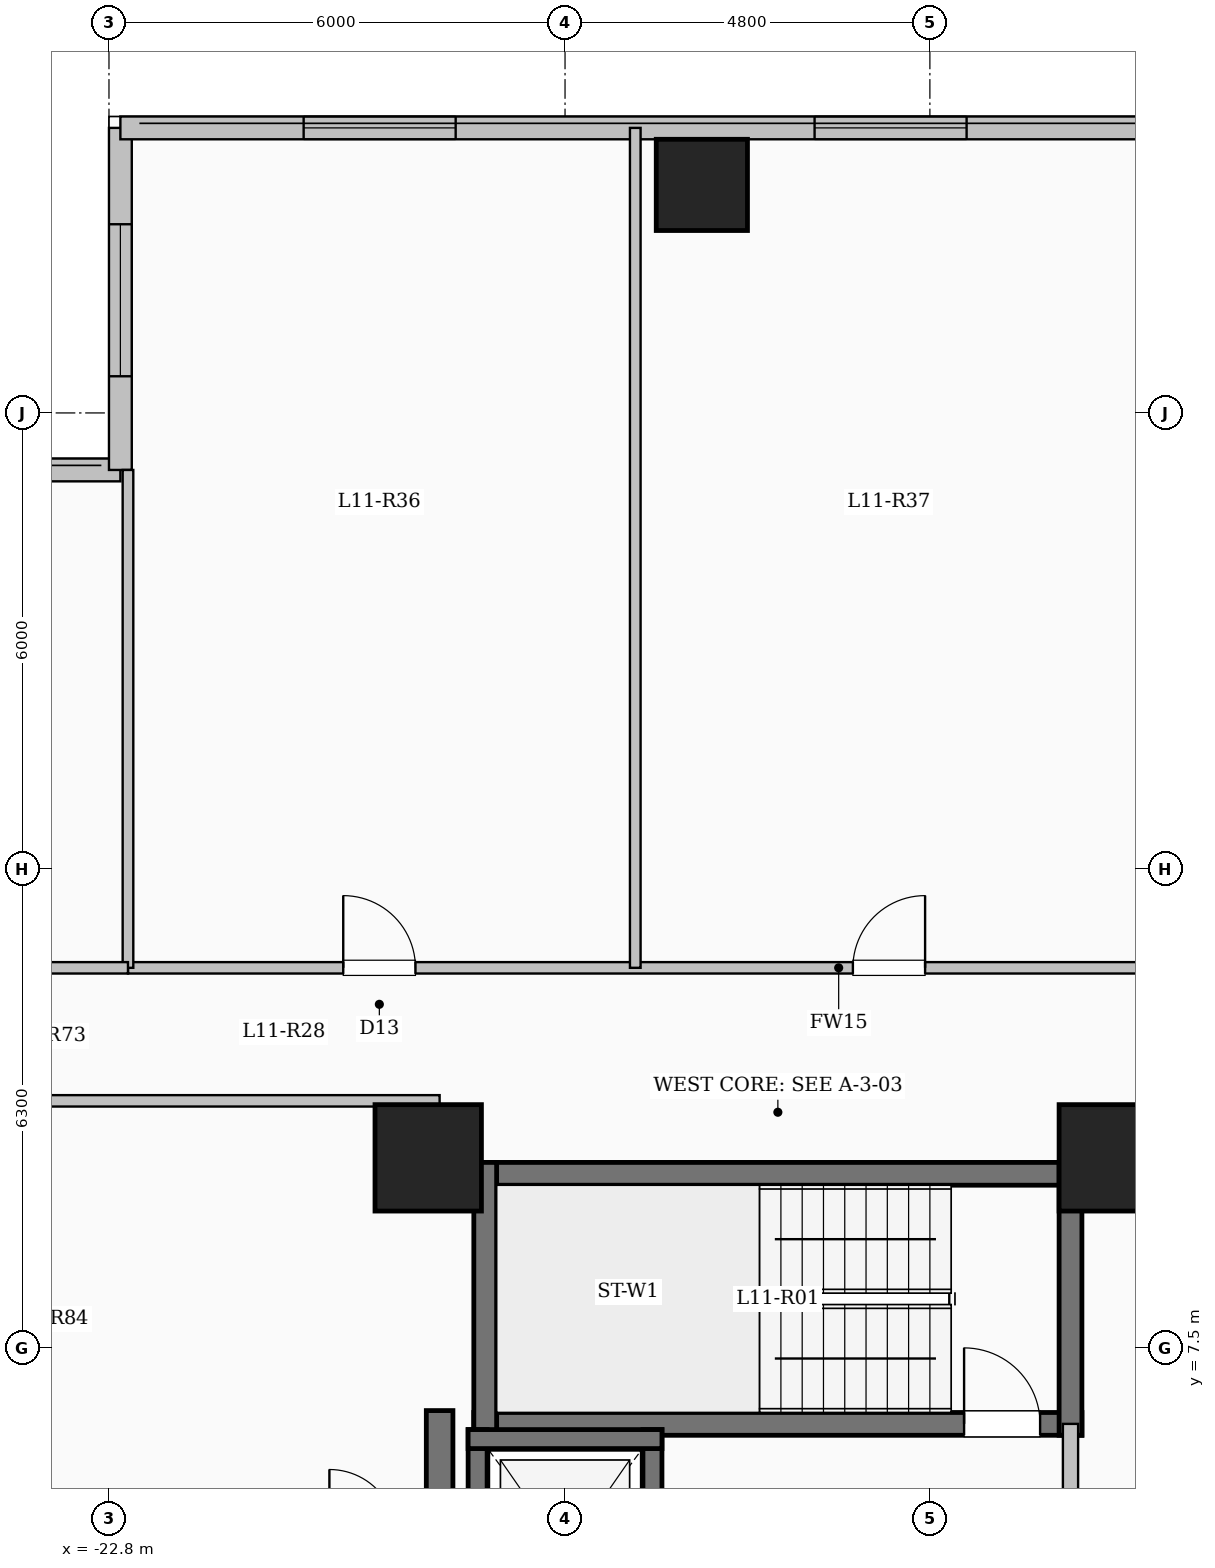
"""IFC4 building model, lengths in metres.
Left out: names, types, materials, properties, quantities, classifications, styles, units other than length and angle.
Written with IfcOpenShell. Run it as: python <this file> out.ifc"""

import sys

from ifc_helpers import new_model, si_unit, direction, frame, frame_2d, origin, origin_2d, place, context, subcontext, project, spatial, rectangle, extrude, element, fill, save


model = new_model("IFC4")
c1 = context("Model", 3, precision=1e-05, world=origin(), true_north=direction((0.0, 1.0)))
c2 = subcontext(c1, "Body", "Model", "MODEL_VIEW")
j1 = project(units=[si_unit("LENGTHUNIT", "METRE"), si_unit("PLANEANGLEUNIT", "RADIAN")], contexts=[c1])
p1 = place(None, origin())
s1 = spatial("IfcSite", under=j1, at=p1, CompositionType="ELEMENT")
p2 = place(p1, origin())
s2 = spatial("IfcBuilding", under=s1, at=p2, CompositionType="ELEMENT")
p3 = place(p2, frame((0.0, 0.0, 44.1)))
s3 = spatial("IfcBuildingStorey", under=s2, at=p3, CompositionType="ELEMENT", Elevation=44.1)
for number, where, z_axis, x_axis in (
    (1, (-9.6, 10.0, 0.0), (0.0, 0.0, 1.0), (1.0, 0.0, 0.0)),
    (2, (-18.6, 10.0, 0.0), (0.0, 0.0, 1.0), (1.0, 0.0, 0.0)),
):
    element("IfcColumn", number, at=place(p3, frame(where, z_axis=z_axis, x_axis=x_axis)), inside=s3, PredefinedType="COLUMN", context=c2, shape_type="SweptSolid", body=[
        extrude(rectangle(XDim=1.4, YDim=1.4, at=origin_2d()), origin(), (0.0, 0.0, 1.0), 3.35),
    ])
p4 = place(p3, frame((-15.0, 22.8, 0.0), z_axis=(0.0, 0.0, 1.0), x_axis=(1.0, 0.0, 0.0)))
e3 = element("IfcColumn", 3, at=p4, inside=s3, PredefinedType="COLUMN", context=c2, shape_type="SweptSolid", body=[
    extrude(rectangle(XDim=1.2, YDim=1.2, at=origin_2d()), origin(), (0.0, 0.0, 1.0), 3.35),
])
p5 = place(p3, frame((-28.65, 19.05, 0.0), z_axis=(0.0, 0.0, 1.0), x_axis=(1.0, 0.0, 0.0)))
e4 = element("IfcWall", 4, at=p5, inside=s3, PredefinedType="SOLIDWALL", context=c2, shape_type="SweptSolid", body=[
    extrude(rectangle(XDim=6.0, YDim=0.3, at=frame_2d((3.0, 0.0))), origin(), (0.0, 0.0, 1.0), 3.1),
])
p6 = place(p5, frame((2.025, 0.0, 0.9)))
e5 = element("IfcOpeningElement", 5, at=p6, cuts=e4, PredefinedType="OPENING", context=c2, shape_type="SweptSolid", body=[
    extrude(rectangle(XDim=2.0, YDim=1.7, at=frame_2d((1.0, 0.85))), frame((0.0, 0.16, 0.0), z_axis=(0.0, -1.0, 0.0), x_axis=(1.0, 0.0, 0.0)), (0.0, 0.0, 1.0), 0.32),
])
p7 = place(p3, frame((-22.65, 19.05, 0.0), z_axis=(0.0, 0.0, 1.0), x_axis=(0.0, 1.0, 0.0)))
e6 = element("IfcWall", 6, at=p7, inside=s3, PredefinedType="SOLIDWALL", context=c2, shape_type="SweptSolid", body=[
    extrude(rectangle(XDim=4.5, YDim=0.3, at=frame_2d((2.25, 0.0))), origin(), (0.0, 0.0, 1.0), 3.1),
])
p8 = place(p7, frame((1.232, 0.0, 0.9)))
e7 = element("IfcOpeningElement", 7, at=p8, cuts=e6, PredefinedType="OPENING", context=c2, shape_type="SweptSolid", body=[
    extrude(rectangle(XDim=2.0, YDim=1.7, at=frame_2d((1.0, 0.85))), frame((0.0, 0.16, 0.0), z_axis=(0.0, -1.0, 0.0), x_axis=(1.0, 0.0, 0.0)), (0.0, 0.0, 1.0), 0.32),
])
p9 = place(p3, frame((-22.65, 23.55, 0.0), z_axis=(0.0, 0.0, 1.0), x_axis=(1.0, 0.0, 0.0)))
e8 = element("IfcWall", 8, at=p9, inside=s3, PredefinedType="SOLIDWALL", context=c2, shape_type="SweptSolid", body=[
    extrude(rectangle(XDim=15.3, YDim=0.3, at=frame_2d((7.65, 0.0))), origin(), (0.0, 0.0, 1.0), 3.1),
])
p10 = place(p9, frame((2.411, 0.0, 0.9)))
e9 = element("IfcOpeningElement", 9, at=p10, cuts=e8, PredefinedType="OPENING", context=c2, shape_type="SweptSolid", body=[
    extrude(rectangle(XDim=2.0, YDim=1.7, at=frame_2d((1.0, 0.85))), frame((0.0, 0.16, 0.0), z_axis=(0.0, -1.0, 0.0), x_axis=(1.0, 0.0, 0.0)), (0.0, 0.0, 1.0), 0.32),
])
p11 = place(p9, frame((9.133, 0.0, 0.9)))
e10 = element("IfcOpeningElement", 10, at=p11, cuts=e8, PredefinedType="OPENING", context=c2, shape_type="SweptSolid", body=[
    extrude(rectangle(XDim=2.0, YDim=1.7, at=frame_2d((1.0, 0.85))), frame((0.0, 0.16, 0.0), z_axis=(0.0, -1.0, 0.0), x_axis=(1.0, 0.0, 0.0)), (0.0, 0.0, 1.0), 0.32),
])
p12 = place(p9, frame((13.862, 0.0, 0.95)))
e11 = element("IfcOpeningElement", 11, at=p12, cuts=e8, PredefinedType="OPENING", context=c2, shape_type="SweptSolid", body=[
    extrude(rectangle(XDim=1.2, YDim=1.5, at=frame_2d((0.6, 0.75))), frame((0.0, 0.16, 0.0), z_axis=(0.0, -1.0, 0.0), x_axis=(1.0, 0.0, 0.0)), (0.0, 0.0, 1.0), 0.32),
])
p13 = place(p3, frame((-18.0, 9.79, 0.0), z_axis=(0.0, 0.0, 1.0), x_axis=(1.0, 0.0, 0.0)))
e12 = element("IfcWall", 12, at=p13, inside=s3, PredefinedType="SHEAR", context=c2, shape_type="SweptSolid", body=[
    extrude(rectangle(XDim=8.0, YDim=0.3, at=frame_2d((4.0, 0.0))), origin(), (0.0, 0.0, 1.0), 3.35),
])
p14 = place(p3, frame((-18.0, 6.5, 0.0), z_axis=(0.0, 0.0, 1.0), x_axis=(1.0, 0.0, 0.0)))
e13 = element("IfcWall", 13, at=p14, inside=s3, PredefinedType="SHEAR", context=c2, shape_type="SweptSolid", body=[
    extrude(rectangle(XDim=8.0, YDim=0.3, at=frame_2d((4.0, 0.0))), origin(), (0.0, 0.0, 1.0), 3.35),
])
p15 = place(p14, frame((6.45, 0.0, 0.0)))
e14 = element("IfcOpeningElement", 14, at=p15, cuts=e13, PredefinedType="OPENING", context=c2, shape_type="SweptSolid", body=[
    extrude(rectangle(XDim=1.0, YDim=2.15, at=frame_2d((0.5, 1.075))), frame((0.0, 0.16, 0.0), z_axis=(0.0, -1.0, 0.0), x_axis=(1.0, 0.0, 0.0)), (0.0, 0.0, 1.0), 0.32),
])
for number, where, z_axis, x_axis in (
    (15, (-17.85, 6.35, 0.0), (0.0, 0.0, 1.0), (0.0, 1.0, 0.0)),
    (16, (-10.15, 6.35, 0.0), (0.0, 0.0, 1.0), (0.0, 1.0, 0.0)),
):
    element("IfcWall", number, at=place(p3, frame(where, z_axis=z_axis, x_axis=x_axis)), inside=s3, PredefinedType="SHEAR", context=c2, shape_type="SweptSolid", body=[
        extrude(rectangle(XDim=3.59, YDim=0.3, at=frame_2d((1.795, 0.0))), origin(), (0.0, 0.0, 1.0), 3.35),
    ])
p16 = place(p3, frame((-10.15, 3.25, 0.0), z_axis=(0.0, 0.0, 1.0), x_axis=(0.0, 1.0, 0.0)))
e17 = element("IfcWall", 17, at=p16, inside=s3, PredefinedType="SOLIDWALL", context=c2, shape_type="SweptSolid", body=[
    extrude(rectangle(XDim=3.25, YDim=0.2, at=frame_2d((1.625, 0.0))), origin(), (0.0, 0.0, 1.0), 3.1),
])
p17 = place(p16, frame((1.1, 0.0, 0.0)))
e18 = element("IfcOpeningElement", 18, at=p17, cuts=e17, PredefinedType="OPENING", context=c2, shape_type="SweptSolid", body=[
    extrude(rectangle(XDim=1.02, YDim=2.15, at=frame_2d((0.51, 1.075))), frame((0.0, 0.11, 0.0), z_axis=(0.0, -1.0, 0.0), x_axis=(1.0, 0.0, 0.0)), (0.0, 0.0, 1.0), 0.22),
])
p18 = place(p3, frame((-17.95, 3.175, 0.0), z_axis=(0.0, 0.0, 1.0), x_axis=(0.0, 1.0, 0.0)))
e19 = element("IfcWall", 19, at=p18, inside=s3, PredefinedType="SHEAR", context=c2, shape_type="SweptSolid", body=[
    extrude(rectangle(XDim=3.25, YDim=0.25, at=frame_2d((1.625, 0.0))), origin(), (0.0, 0.0, 1.0), 3.35),
])
p19 = place(p3, frame((-15.65, 3.175, 0.0), z_axis=(0.0, 0.0, 1.0), x_axis=(0.0, 1.0, 0.0)))
e20 = element("IfcWall", 20, at=p19, inside=s3, PredefinedType="SHEAR", context=c2, shape_type="SweptSolid", body=[
    extrude(rectangle(XDim=3.25, YDim=0.25, at=frame_2d((1.625, 0.0))), origin(), (0.0, 0.0, 1.0), 3.35),
])
p20 = place(p19, frame((1.075, 0.0, 0.0)))
e21 = element("IfcOpeningElement", 21, at=p20, cuts=e20, PredefinedType="OPENING", context=c2, shape_type="SweptSolid", body=[
    extrude(rectangle(XDim=1.1, YDim=2.15, at=frame_2d((0.55, 1.075))), frame((0.0, 0.135, 0.0), z_axis=(0.0, -1.0, 0.0), x_axis=(1.0, 0.0, 0.0)), (0.0, 0.0, 1.0), 0.27),
])
p21 = place(p3, frame((-18.075, 6.3, 0.0), z_axis=(0.0, 0.0, 1.0), x_axis=(1.0, 0.0, 0.0)))
e22 = element("IfcWall", 22, at=p21, inside=s3, PredefinedType="SHEAR", context=c2, shape_type="SweptSolid", body=[
    extrude(rectangle(XDim=2.55, YDim=0.25, at=frame_2d((1.275, 0.0))), origin(), (0.0, 0.0, 1.0), 3.35),
])
p22 = place(p3, frame((-18.45, -7.375, 0.0), z_axis=(0.0, 0.0, 1.0), x_axis=(0.0, 1.0, 0.0)))
e23 = element("IfcWall", 23, at=p22, inside=s3, PredefinedType="SHEAR", context=c2, shape_type="SweptSolid", body=[
    extrude(rectangle(XDim=14.05, YDim=0.35, at=frame_2d((7.025, 0.0))), origin(), (0.0, 0.0, 1.0), 3.35),
])
p23 = place(p3, frame((-22.55, 12.5, 0.0), z_axis=(0.0, 0.0, 1.0), x_axis=(1.0, 0.0, 0.0)))
e24 = element("IfcWall", 24, at=p23, inside=s3, PredefinedType="PARTITIONING", context=c2, shape_type="SweptSolid", body=[
    extrude(rectangle(XDim=18.7, YDim=0.15, at=frame_2d((9.35, 0.0))), origin(), (0.0, 0.0, 1.0), 3.1),
])
p24 = place(p23, frame((2.832, 0.0, 0.0)))
e25 = element("IfcOpeningElement", 25, at=p24, cuts=e24, PredefinedType="OPENING", context=c2, shape_type="SweptSolid", body=[
    extrude(rectangle(XDim=0.95, YDim=2.15, at=frame_2d((0.475, 1.075))), frame((0.0, 0.085, 0.0), z_axis=(0.0, -1.0, 0.0), x_axis=(1.0, 0.0, 0.0)), (0.0, 0.0, 1.0), 0.17),
])
p25 = place(p23, frame((9.537, 0.0, 0.0)))
e26 = element("IfcOpeningElement", 26, at=p25, cuts=e24, PredefinedType="OPENING", context=c2, shape_type="SweptSolid", body=[
    extrude(rectangle(XDim=0.95, YDim=2.15, at=frame_2d((0.475, 1.075))), frame((0.0, 0.085, 0.0), z_axis=(0.0, -1.0, 0.0), x_axis=(1.0, 0.0, 0.0)), (0.0, 0.0, 1.0), 0.17),
])
p26 = place(p23, frame((15.5, 0.0, 0.0)))
e27 = element("IfcOpeningElement", 27, at=p26, cuts=e24, PredefinedType="OPENING", context=c2, shape_type="SweptSolid", body=[
    extrude(rectangle(XDim=0.95, YDim=2.15, at=frame_2d((0.475, 1.075))), frame((0.0, 0.085, 0.0), z_axis=(0.0, -1.0, 0.0), x_axis=(1.0, 0.0, 0.0)), (0.0, 0.0, 1.0), 0.17),
])
p27 = place(p3, frame((-15.876, 12.5, 0.0), z_axis=(0.0, 0.0, 1.0), x_axis=(0.0, 1.0, 0.0)))
e28 = element("IfcWall", 28, at=p27, inside=s3, PredefinedType="PARTITIONING", context=c2, shape_type="SweptSolid", body=[
    extrude(rectangle(XDim=11.05, YDim=0.14, at=frame_2d((5.525, 0.0))), origin(), (0.0, 0.0, 1.0), 3.1),
])
p28 = place(p3, frame((-28.68, 10.75, 0.0), z_axis=(0.0, 0.0, 1.0), x_axis=(1.0, 0.0, 0.0)))
e29 = element("IfcWall", 29, at=p28, inside=s3, PredefinedType="PARTITIONING", context=c2, shape_type="SweptSolid", body=[
    extrude(rectangle(XDim=10.23, YDim=0.15, at=frame_2d((5.115, 0.0))), origin(), (0.0, 0.0, 1.0), 3.1),
])
p29 = place(p3, frame((-22.55, 12.5, 0.0), z_axis=(0.0, 0.0, 1.0), x_axis=(0.0, 1.0, 0.0)))
e30 = element("IfcWall", 30, at=p29, inside=s3, PredefinedType="PARTITIONING", context=c2, shape_type="SweptSolid", body=[
    extrude(rectangle(XDim=6.55, YDim=0.14, at=frame_2d((3.275, 0.0))), origin(), (0.0, 0.0, 1.0), 3.1),
])
p30 = place(p3, frame((-28.68, 12.5, 0.0), z_axis=(0.0, 0.0, 1.0), x_axis=(1.0, 0.0, 0.0)))
e31 = element("IfcWall", 31, at=p30, inside=s3, PredefinedType="PARTITIONING", context=c2, shape_type="SweptSolid", body=[
    extrude(rectangle(XDim=6.13, YDim=0.15, at=frame_2d((3.065, 0.0))), origin(), (0.0, 0.0, 1.0), 3.1),
])
p31 = place(p30, frame((2.59, 0.0, 0.0)))
e32 = element("IfcOpeningElement", 32, at=p31, cuts=e31, PredefinedType="OPENING", context=c2, shape_type="SweptSolid", body=[
    extrude(rectangle(XDim=0.95, YDim=2.15, at=frame_2d((0.475, 1.075))), frame((0.0, 0.085, 0.0), z_axis=(0.0, -1.0, 0.0), x_axis=(1.0, 0.0, 0.0)), (0.0, 0.0, 1.0), 0.17),
])
p32 = place(p8, origin())
e33 = element("IfcWindow", 33, at=p32, inside=s3, PartitioningType="SINGLE_PANEL", PredefinedType="WINDOW", context=c2, shape_type="SweptSolid", body=[
    extrude(rectangle(XDim=2.0, YDim=1.7, at=frame_2d((1.0, 0.85))), frame((0.0, 0.03, 0.0), z_axis=(0.0, -1.0, 0.0), x_axis=(1.0, 0.0, 0.0)), (0.0, 0.0, 1.0), 0.06),
])
fill(e7, e33)
p33 = place(p10, origin())
e34 = element("IfcWindow", 34, at=p33, inside=s3, PartitioningType="SINGLE_PANEL", PredefinedType="WINDOW", context=c2, shape_type="SweptSolid", body=[
    extrude(rectangle(XDim=2.0, YDim=1.7, at=frame_2d((1.0, 0.85))), frame((0.0, 0.03, 0.0), z_axis=(0.0, -1.0, 0.0), x_axis=(1.0, 0.0, 0.0)), (0.0, 0.0, 1.0), 0.06),
])
fill(e9, e34)
p34 = place(p11, origin())
e35 = element("IfcWindow", 35, at=p34, inside=s3, PartitioningType="SINGLE_PANEL", PredefinedType="WINDOW", context=c2, shape_type="SweptSolid", body=[
    extrude(rectangle(XDim=2.0, YDim=1.7, at=frame_2d((1.0, 0.85))), frame((0.0, 0.03, 0.0), z_axis=(0.0, -1.0, 0.0), x_axis=(1.0, 0.0, 0.0)), (0.0, 0.0, 1.0), 0.06),
])
fill(e10, e35)
p35 = place(p15, origin())
e36 = element("IfcDoor", 36, at=p35, inside=s3, OperationType="SINGLE_SWING_LEFT", PredefinedType="DOOR", context=c2, shape_type="SweptSolid", body=[
    extrude(rectangle(XDim=1.0, YDim=2.15, at=frame_2d((0.5, 1.075))), frame((0.0, 0.025, 0.0), z_axis=(0.0, -1.0, 0.0), x_axis=(1.0, 0.0, 0.0)), (0.0, 0.0, 1.0), 0.05),
])
fill(e14, e36)
p36 = place(p24, origin())
e37 = element("IfcDoor", 37, at=p36, inside=s3, OperationType="SINGLE_SWING_LEFT", PredefinedType="DOOR", context=c2, shape_type="SweptSolid", body=[
    extrude(rectangle(XDim=0.95, YDim=2.15, at=frame_2d((0.475, 1.075))), frame((0.0, 0.025, 0.0), z_axis=(0.0, -1.0, 0.0), x_axis=(1.0, 0.0, 0.0)), (0.0, 0.0, 1.0), 0.05),
])
fill(e25, e37)
p37 = place(p25, origin())
e38 = element("IfcDoor", 38, at=p37, inside=s3, OperationType="SINGLE_SWING_RIGHT", PredefinedType="DOOR", context=c2, shape_type="SweptSolid", body=[
    extrude(rectangle(XDim=0.95, YDim=2.15, at=frame_2d((0.475, 1.075))), frame((0.0, 0.025, 0.0), z_axis=(0.0, -1.0, 0.0), x_axis=(1.0, 0.0, 0.0)), (0.0, 0.0, 1.0), 0.05),
])
fill(e26, e38)
save(model, sys.argv[1])
